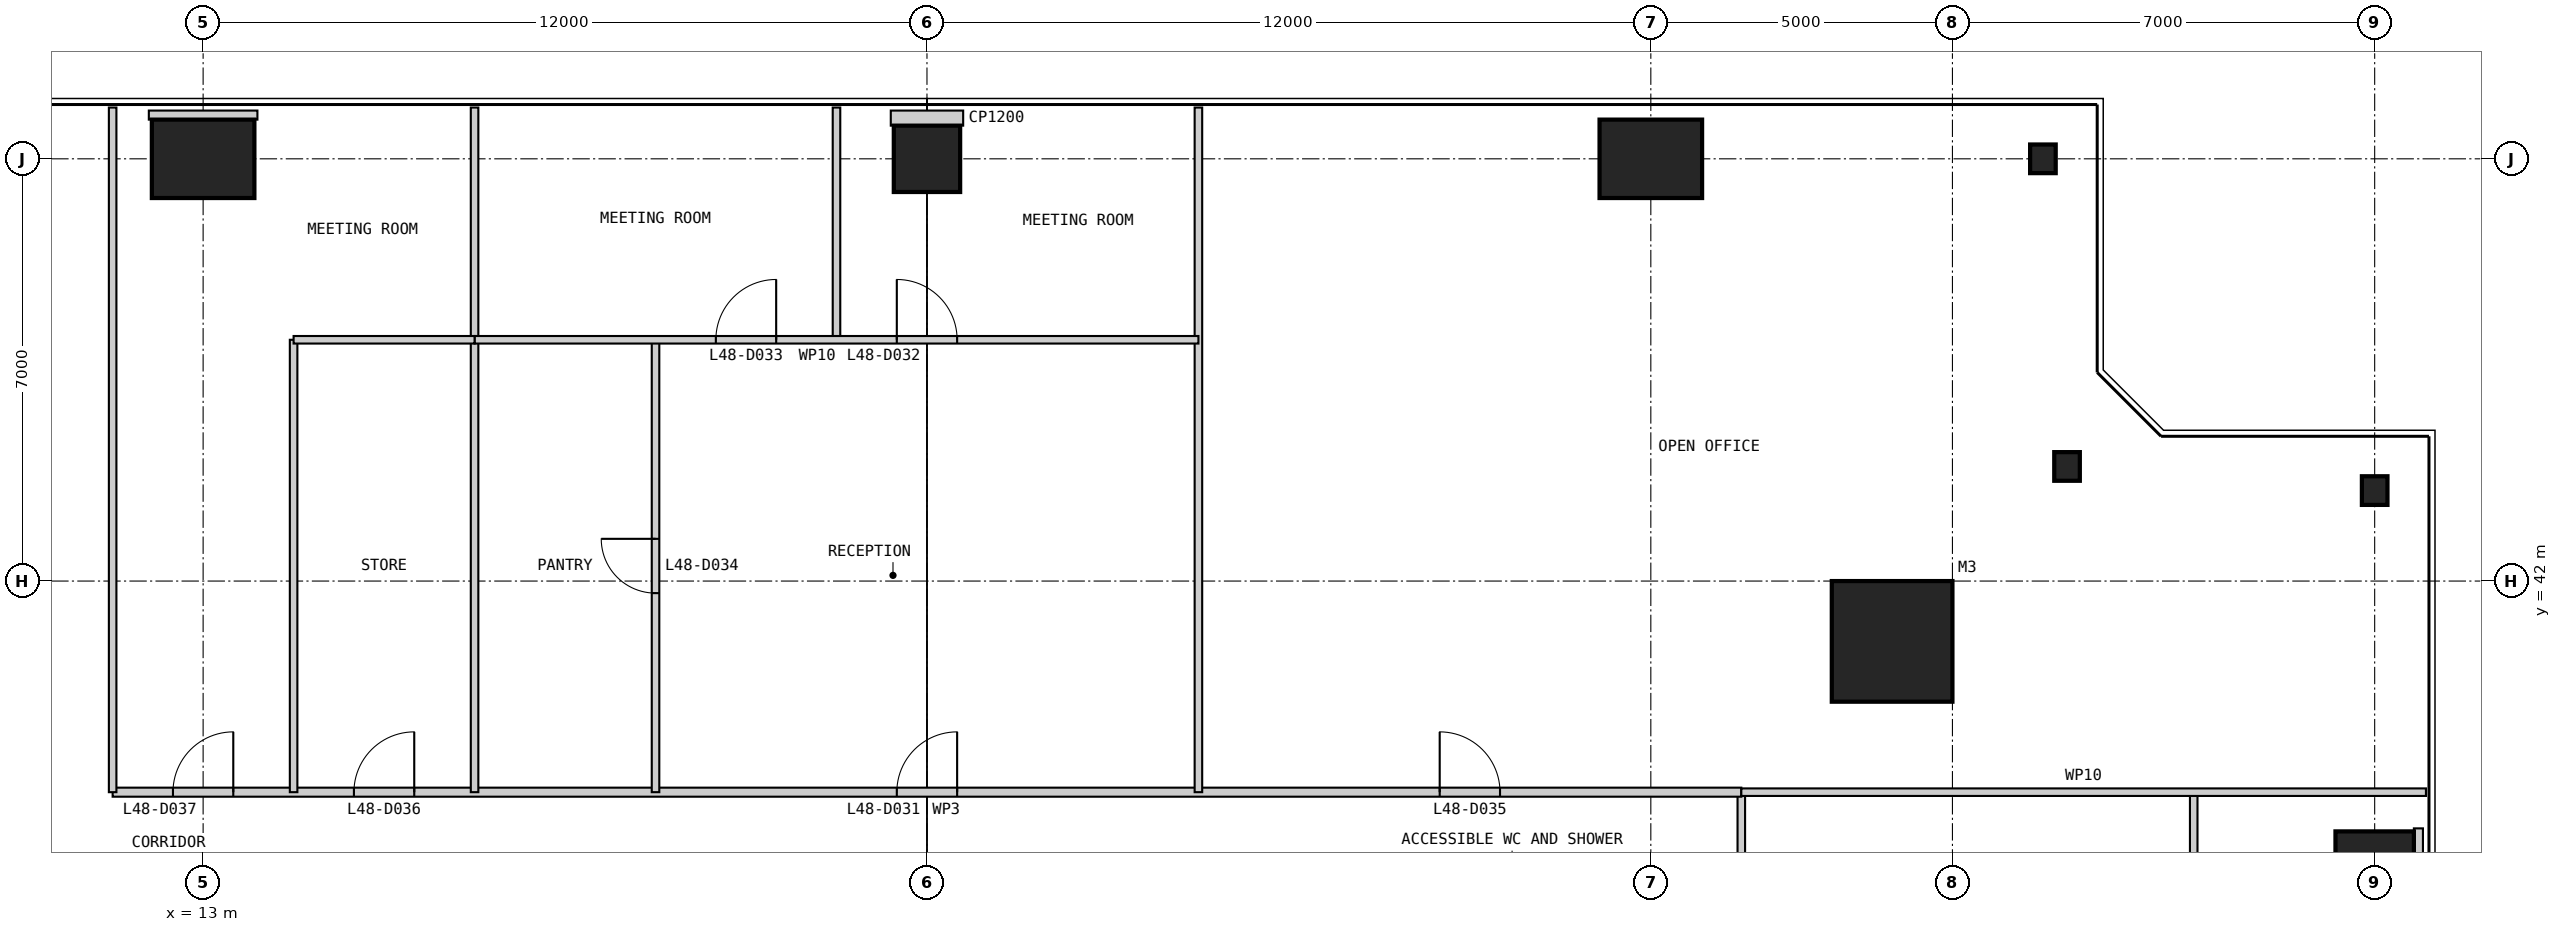
"""IFC4 building model, lengths in metres.
Left out: names, types, materials, properties, quantities, classifications, styles, units other than length and angle.
Written with IfcOpenShell. Run it as: python <this file> out.ifc"""

import sys

from ifc_helpers import new_model, si_unit, direction, frame, frame_2d, origin, origin_2d, place, context, subcontext, project, spatial, rectangle, i_section, extrude, element, fill, save


model = new_model("IFC4")
c1 = context("Model", 3, precision=1e-05, world=origin(), true_north=direction((0.0, 1.0)))
c2 = subcontext(c1, "Body", "Model", "MODEL_VIEW")
j1 = project(units=[si_unit("LENGTHUNIT", "METRE"), si_unit("PLANEANGLEUNIT", "RADIAN")], contexts=[c1])
p1 = place(None, origin())
s1 = spatial("IfcSite", under=j1, at=p1, CompositionType="ELEMENT")
p2 = place(p1, origin())
s2 = spatial("IfcBuilding", under=s1, at=p2, CompositionType="ELEMENT")
p3 = place(p2, frame((0.0, 0.0, 205.8)))
s3 = spatial("IfcBuildingStorey", under=s2, at=p3, CompositionType="ELEMENT", Elevation=205.8)
p4 = place(p3, frame((41.0, 41.0, 0.0), z_axis=(0.0, 0.0, 1.0), x_axis=(1.0, 0.0, 0.0)))
e1 = element("IfcColumn", 1, at=p4, inside=s3, PredefinedType="COLUMN", context=c2, shape_type="SweptSolid", body=[
    extrude(rectangle(XDim=2.0, YDim=2.0, at=origin_2d()), origin(), (0.0, 0.0, 1.0), 4.0),
])
p5 = place(p3, frame((49.0, 37.0, 0.0), z_axis=(0.0, 0.0, 1.0), x_axis=(1.0, 0.0, 0.0)))
e2 = element("IfcColumn", 2, at=p5, inside=s3, PredefinedType="COLUMN", context=c2, shape_type="SweptSolid", body=[
    extrude(rectangle(XDim=1.3, YDim=1.7, at=origin_2d()), origin(), (0.0, 0.0, 1.0), 4.0),
])
for number, where, z_axis, x_axis in (
    (3, (49.0, 43.5, 0.0), (0.0, 0.0, 1.0), (1.0, 0.0, 0.0)),
    (4, (43.9, 43.9, 0.0), (0.0, 0.0, 1.0), (1.0, 0.0, 0.0)),
    (5, (43.5, 49.0, 0.0), (0.0, 0.0, 1.0), (1.0, 0.0, 0.0)),
):
    element("IfcColumn", number, at=place(p3, frame(where, z_axis=z_axis, x_axis=x_axis)), inside=s3, PredefinedType="COLUMN", context=c2, shape_type="SweptSolid", body=[
        extrude(i_section(OverallWidth=0.424, OverallDepth=0.475, WebThickness=0.048, FlangeThickness=0.077, at=origin_2d()), origin(), (0.0, 0.0, 1.0), 4.0),
    ])
p6 = place(p3, frame((37.0, 49.0, 0.0), z_axis=(0.0, 0.0, 1.0), x_axis=(1.0, 0.0, 0.0)))
e6 = element("IfcColumn", 6, at=p6, inside=s3, PredefinedType="COLUMN", context=c2, shape_type="SweptSolid", body=[
    extrude(rectangle(XDim=1.7, YDim=1.3, at=origin_2d()), origin(), (0.0, 0.0, 1.0), 4.0),
])
p7 = place(p3, frame((25.0, 49.0, 0.0), z_axis=(0.0, 0.0, 1.0), x_axis=(1.0, 0.0, 0.0)))
e7 = element("IfcColumn", 7, at=p7, inside=s3, PredefinedType="COLUMN", context=c2, shape_type="SweptSolid", body=[
    extrude(rectangle(XDim=1.1, YDim=1.1, at=origin_2d()), origin(), (0.0, 0.0, 1.0), 4.0),
])
p8 = place(p3, frame((13.0, 49.0, 0.0), z_axis=(0.0, 0.0, 1.0), x_axis=(1.0, 0.0, 0.0)))
e8 = element("IfcColumn", 8, at=p8, inside=s3, PredefinedType="COLUMN", context=c2, shape_type="SweptSolid", body=[
    extrude(rectangle(XDim=1.7, YDim=1.3, at=origin_2d()), origin(), (0.0, 0.0, 1.0), 4.0),
])
p9 = place(p3, frame((46.0, 32.5, 0.0), z_axis=(0.0, 0.0, 1.0), x_axis=(0.0, 1.0, 0.0)))
e9 = element("IfcWall", 9, at=p9, inside=s3, PredefinedType="PARTITIONING", context=c2, shape_type="SweptSolid", body=[
    extrude(rectangle(XDim=6.0, YDim=0.125, at=frame_2d((3.0, 0.0))), origin(), (0.0, 0.0, 1.0), 3.238),
])
p10 = place(p3, frame((38.5, 35.5, 0.0), z_axis=(0.0, 0.0, 1.0), x_axis=(0.0, 1.0, 0.0)))
e10 = element("IfcWall", 10, at=p10, inside=s3, PredefinedType="PARTITIONING", context=c2, shape_type="SweptSolid", body=[
    extrude(rectangle(XDim=3.0, YDim=0.125, at=frame_2d((1.5, 0.0))), origin(), (0.0, 0.0, 1.0), 3.85),
])
p11 = place(p3, frame((38.5, 38.5, 0.0), z_axis=(0.0, 0.0, 1.0), x_axis=(-1.0, 0.0, 0.0)))
e11 = element("IfcWall", 11, at=p11, inside=s3, PredefinedType="PARTITIONING", context=c2, shape_type="SweptSolid", body=[
    extrude(rectangle(XDim=27.0, YDim=0.15, at=frame_2d((13.5, 0.0))), origin(), (0.0, 0.0, 1.0), 3.85),
])
p12 = place(p11, frame((13.0, 0.0, 0.0)))
e12 = element("IfcOpeningElement", 12, at=p12, cuts=e11, PredefinedType="OPENING", context=c2, shape_type="SweptSolid", body=[
    extrude(rectangle(XDim=1.0, YDim=2.2, at=frame_2d((0.5, 1.1))), frame((0.0, 0.085, 0.0), z_axis=(0.0, -1.0, 0.0), x_axis=(1.0, 0.0, 0.0)), (0.0, 0.0, 1.0), 0.17),
])
p13 = place(p11, frame((4.0, 0.0, 0.0)))
e13 = element("IfcOpeningElement", 13, at=p13, cuts=e11, PredefinedType="OPENING", context=c2, shape_type="SweptSolid", body=[
    extrude(rectangle(XDim=1.0, YDim=2.2, at=frame_2d((0.5, 1.1))), frame((0.0, 0.085, 0.0), z_axis=(0.0, -1.0, 0.0), x_axis=(1.0, 0.0, 0.0)), (0.0, 0.0, 1.0), 0.17),
])
p14 = place(p11, frame((22.0, 0.0, 0.0)))
e14 = element("IfcOpeningElement", 14, at=p14, cuts=e11, PredefinedType="OPENING", context=c2, shape_type="SweptSolid", body=[
    extrude(rectangle(XDim=1.0, YDim=2.2, at=frame_2d((0.5, 1.1))), frame((0.0, 0.085, 0.0), z_axis=(0.0, -1.0, 0.0), x_axis=(1.0, 0.0, 0.0)), (0.0, 0.0, 1.0), 0.17),
])
p15 = place(p11, frame((25.0, 0.0, 0.0)))
e15 = element("IfcOpeningElement", 15, at=p15, cuts=e11, PredefinedType="OPENING", context=c2, shape_type="SweptSolid", body=[
    extrude(rectangle(XDim=1.0, YDim=2.2, at=frame_2d((0.5, 1.1))), frame((0.0, 0.085, 0.0), z_axis=(0.0, -1.0, 0.0), x_axis=(1.0, 0.0, 0.0)), (0.0, 0.0, 1.0), 0.17),
])
for number, where, z_axis, x_axis in (
    (16, (49.85, 38.5, 0.0), (0.0, 0.0, 1.0), (-1.0, 0.0, 0.0)),
    (17, (29.5, 49.85, 0.0), (0.0, 0.0, 1.0), (0.0, -1.0, 0.0)),
):
    element("IfcWall", number, at=place(p3, frame(where, z_axis=z_axis, x_axis=x_axis)), inside=s3, PredefinedType="PARTITIONING", context=c2, shape_type="SweptSolid", body=[
        extrude(rectangle(XDim=11.35, YDim=0.125, at=frame_2d((5.675, 0.0))), origin(), (0.0, 0.0, 1.0), 3.85),
    ])
p16 = place(p3, frame((23.5, 49.85, 0.0), z_axis=(0.0, 0.0, 1.0), x_axis=(0.0, -1.0, 0.0)))
e18 = element("IfcWall", 18, at=p16, inside=s3, PredefinedType="PARTITIONING", context=c2, shape_type="SweptSolid", body=[
    extrude(rectangle(XDim=3.85, YDim=0.125, at=frame_2d((1.925, 0.0))), origin(), (0.0, 0.0, 1.0), 3.85),
])
p17 = place(p3, frame((20.5, 46.0, 0.0), z_axis=(0.0, 0.0, 1.0), x_axis=(0.0, -1.0, 0.0)))
e19 = element("IfcWall", 19, at=p17, inside=s3, PredefinedType="PARTITIONING", context=c2, shape_type="SweptSolid", body=[
    extrude(rectangle(XDim=7.5, YDim=0.125, at=frame_2d((3.75, 0.0))), origin(), (0.0, 0.0, 1.0), 3.85),
])
p18 = place(p17, frame((3.3, 0.0, 0.0)))
e20 = element("IfcOpeningElement", 20, at=p18, cuts=e19, PredefinedType="OPENING", context=c2, shape_type="SweptSolid", body=[
    extrude(rectangle(XDim=0.9, YDim=2.2, at=frame_2d((0.45, 1.1))), frame((0.0, 0.073, 0.0), z_axis=(0.0, -1.0, 0.0), x_axis=(1.0, 0.0, 0.0)), (0.0, 0.0, 1.0), 0.145),
])
p19 = place(p3, frame((17.5, 49.85, 0.0), z_axis=(0.0, 0.0, 1.0), x_axis=(0.0, -1.0, 0.0)))
e21 = element("IfcWall", 21, at=p19, inside=s3, PredefinedType="PARTITIONING", context=c2, shape_type="SweptSolid", body=[
    extrude(rectangle(XDim=11.35, YDim=0.125, at=frame_2d((5.675, 0.0))), origin(), (0.0, 0.0, 1.0), 3.85),
])
p20 = place(p3, frame((14.5, 46.0, 0.0), z_axis=(0.0, 0.0, 1.0), x_axis=(0.0, -1.0, 0.0)))
e22 = element("IfcWall", 22, at=p20, inside=s3, PredefinedType="PARTITIONING", context=c2, shape_type="SweptSolid", body=[
    extrude(rectangle(XDim=7.5, YDim=0.125, at=frame_2d((3.75, 0.0))), origin(), (0.0, 0.0, 1.0), 3.85),
])
p21 = place(p3, frame((29.5, 46.0, 0.0), z_axis=(0.0, 0.0, 1.0), x_axis=(-1.0, 0.0, 0.0)))
e23 = element("IfcWall", 23, at=p21, inside=s3, PredefinedType="PARTITIONING", context=c2, shape_type="SweptSolid", body=[
    extrude(rectangle(XDim=12.0, YDim=0.125, at=frame_2d((6.0, 0.0))), origin(), (0.0, 0.0, 1.0), 3.85),
])
p22 = place(p21, frame((4.0, 0.0, 0.0)))
e24 = element("IfcOpeningElement", 24, at=p22, cuts=e23, PredefinedType="OPENING", context=c2, shape_type="SweptSolid", body=[
    extrude(rectangle(XDim=1.0, YDim=2.2, at=frame_2d((0.5, 1.1))), frame((0.0, 0.073, 0.0), z_axis=(0.0, -1.0, 0.0), x_axis=(1.0, 0.0, 0.0)), (0.0, 0.0, 1.0), 0.145),
])
p23 = place(p21, frame((7.0, 0.0, 0.0)))
e25 = element("IfcOpeningElement", 25, at=p23, cuts=e23, PredefinedType="OPENING", context=c2, shape_type="SweptSolid", body=[
    extrude(rectangle(XDim=1.0, YDim=2.2, at=frame_2d((0.5, 1.1))), frame((0.0, 0.073, 0.0), z_axis=(0.0, -1.0, 0.0), x_axis=(1.0, 0.0, 0.0)), (0.0, 0.0, 1.0), 0.145),
])
p24 = place(p3, frame((17.5, 46.0, 0.0), z_axis=(0.0, 0.0, 1.0), x_axis=(-1.0, 0.0, 0.0)))
e26 = element("IfcWall", 26, at=p24, inside=s3, PredefinedType="PARTITIONING", context=c2, shape_type="SweptSolid", body=[
    extrude(rectangle(XDim=3.0, YDim=0.125, at=frame_2d((1.5, 0.0))), origin(), (0.0, 0.0, 1.0), 3.85),
])
p25 = place(p3, frame((11.5, 49.85, 0.0), z_axis=(0.0, 0.0, 1.0), x_axis=(0.0, -1.0, 0.0)))
e27 = element("IfcWall", 27, at=p25, inside=s3, PredefinedType="PARTITIONING", context=c2, shape_type="SweptSolid", body=[
    extrude(rectangle(XDim=11.35, YDim=0.125, at=frame_2d((5.675, 0.0))), origin(), (0.0, 0.0, 1.0), 3.85),
])
p26 = place(p3, frame((49.8, 37.0, 0.0), z_axis=(0.0, 0.0, 1.0), x_axis=(-1.0, 0.0, 0.0)))
e28 = element("IfcWall", 28, at=p26, inside=s3, PredefinedType="PARTITIONING", context=c2, shape_type="SweptSolid", body=[
    extrude(rectangle(XDim=0.15, YDim=1.8, at=frame_2d((0.075, 0.0))), origin(), (0.0, 0.0, 1.0), 3.85),
])
p27 = place(p3, frame((25.0, 49.8, 0.0), z_axis=(0.0, 0.0, 1.0), x_axis=(0.0, -1.0, 0.0)))
e29 = element("IfcWall", 29, at=p27, inside=s3, PredefinedType="PARTITIONING", context=c2, shape_type="SweptSolid", body=[
    extrude(rectangle(XDim=0.25, YDim=1.2, at=frame_2d((0.125, 0.0))), origin(), (0.0, 0.0, 1.0), 3.85),
])
p28 = place(p3, frame((13.0, 49.8, 0.0), z_axis=(0.0, 0.0, 1.0), x_axis=(0.0, -1.0, 0.0)))
e30 = element("IfcWall", 30, at=p28, inside=s3, PredefinedType="PARTITIONING", context=c2, shape_type="SweptSolid", body=[
    extrude(rectangle(XDim=0.15, YDim=1.8, at=frame_2d((0.075, 0.0))), origin(), (0.0, 0.0, 1.0), 3.85),
])
p29 = place(p12, frame((1.0, 0.0, 0.0), z_axis=(0.0, 0.0, 1.0), x_axis=(-1.0, 0.0, 0.0)))
e31 = element("IfcDoor", 31, at=p29, inside=s3, OperationType="SINGLE_SWING_RIGHT", PredefinedType="DOOR", context=c2, shape_type="SweptSolid", body=[
    extrude(rectangle(XDim=1.0, YDim=2.2, at=frame_2d((0.5, 1.1))), frame((0.0, 0.025, 0.0), z_axis=(0.0, -1.0, 0.0), x_axis=(1.0, 0.0, 0.0)), (0.0, 0.0, 1.0), 0.05),
])
fill(e12, e31)
p30 = place(p22, frame((1.0, 0.0, 0.0), z_axis=(0.0, 0.0, 1.0), x_axis=(-1.0, 0.0, 0.0)))
e32 = element("IfcDoor", 32, at=p30, inside=s3, OperationType="SINGLE_SWING_LEFT", PredefinedType="DOOR", context=c2, shape_type="SweptSolid", body=[
    extrude(rectangle(XDim=1.0, YDim=2.2, at=frame_2d((0.5, 1.1))), frame((0.0, 0.025, 0.0), z_axis=(0.0, -1.0, 0.0), x_axis=(1.0, 0.0, 0.0)), (0.0, 0.0, 1.0), 0.05),
])
fill(e24, e32)
p31 = place(p23, frame((1.0, 0.0, 0.0), z_axis=(0.0, 0.0, 1.0), x_axis=(-1.0, 0.0, 0.0)))
e33 = element("IfcDoor", 33, at=p31, inside=s3, OperationType="SINGLE_SWING_RIGHT", PredefinedType="DOOR", context=c2, shape_type="SweptSolid", body=[
    extrude(rectangle(XDim=1.0, YDim=2.2, at=frame_2d((0.5, 1.1))), frame((0.0, 0.025, 0.0), z_axis=(0.0, -1.0, 0.0), x_axis=(1.0, 0.0, 0.0)), (0.0, 0.0, 1.0), 0.05),
])
fill(e25, e33)
p32 = place(p18, frame((0.9, 0.0, 0.0), z_axis=(0.0, 0.0, 1.0), x_axis=(-1.0, 0.0, 0.0)))
e34 = element("IfcDoor", 34, at=p32, inside=s3, OperationType="SINGLE_SWING_RIGHT", PredefinedType="DOOR", context=c2, shape_type="SweptSolid", body=[
    extrude(rectangle(XDim=0.9, YDim=2.2, at=frame_2d((0.45, 1.1))), frame((0.0, 0.025, 0.0), z_axis=(0.0, -1.0, 0.0), x_axis=(1.0, 0.0, 0.0)), (0.0, 0.0, 1.0), 0.05),
])
fill(e20, e34)
p33 = place(p13, frame((1.0, 0.0, 0.0), z_axis=(0.0, 0.0, 1.0), x_axis=(-1.0, 0.0, 0.0)))
e35 = element("IfcDoor", 35, at=p33, inside=s3, OperationType="SINGLE_SWING_LEFT", PredefinedType="DOOR", context=c2, shape_type="SweptSolid", body=[
    extrude(rectangle(XDim=1.0, YDim=2.2, at=frame_2d((0.5, 1.1))), frame((0.0, 0.025, 0.0), z_axis=(0.0, -1.0, 0.0), x_axis=(1.0, 0.0, 0.0)), (0.0, 0.0, 1.0), 0.05),
])
fill(e13, e35)
p34 = place(p14, frame((1.0, 0.0, 0.0), z_axis=(0.0, 0.0, 1.0), x_axis=(-1.0, 0.0, 0.0)))
e36 = element("IfcDoor", 36, at=p34, inside=s3, OperationType="SINGLE_SWING_RIGHT", PredefinedType="DOOR", context=c2, shape_type="SweptSolid", body=[
    extrude(rectangle(XDim=1.0, YDim=2.2, at=frame_2d((0.5, 1.1))), frame((0.0, 0.025, 0.0), z_axis=(0.0, -1.0, 0.0), x_axis=(1.0, 0.0, 0.0)), (0.0, 0.0, 1.0), 0.05),
])
fill(e14, e36)
p35 = place(p15, frame((1.0, 0.0, 0.0), z_axis=(0.0, 0.0, 1.0), x_axis=(-1.0, 0.0, 0.0)))
e37 = element("IfcDoor", 37, at=p35, inside=s3, OperationType="SINGLE_SWING_RIGHT", PredefinedType="DOOR", context=c2, shape_type="SweptSolid", body=[
    extrude(rectangle(XDim=1.0, YDim=2.2, at=frame_2d((0.5, 1.1))), frame((0.0, 0.025, 0.0), z_axis=(0.0, -1.0, 0.0), x_axis=(1.0, 0.0, 0.0)), (0.0, 0.0, 1.0), 0.05),
])
fill(e15, e37)
save(model, sys.argv[1])
